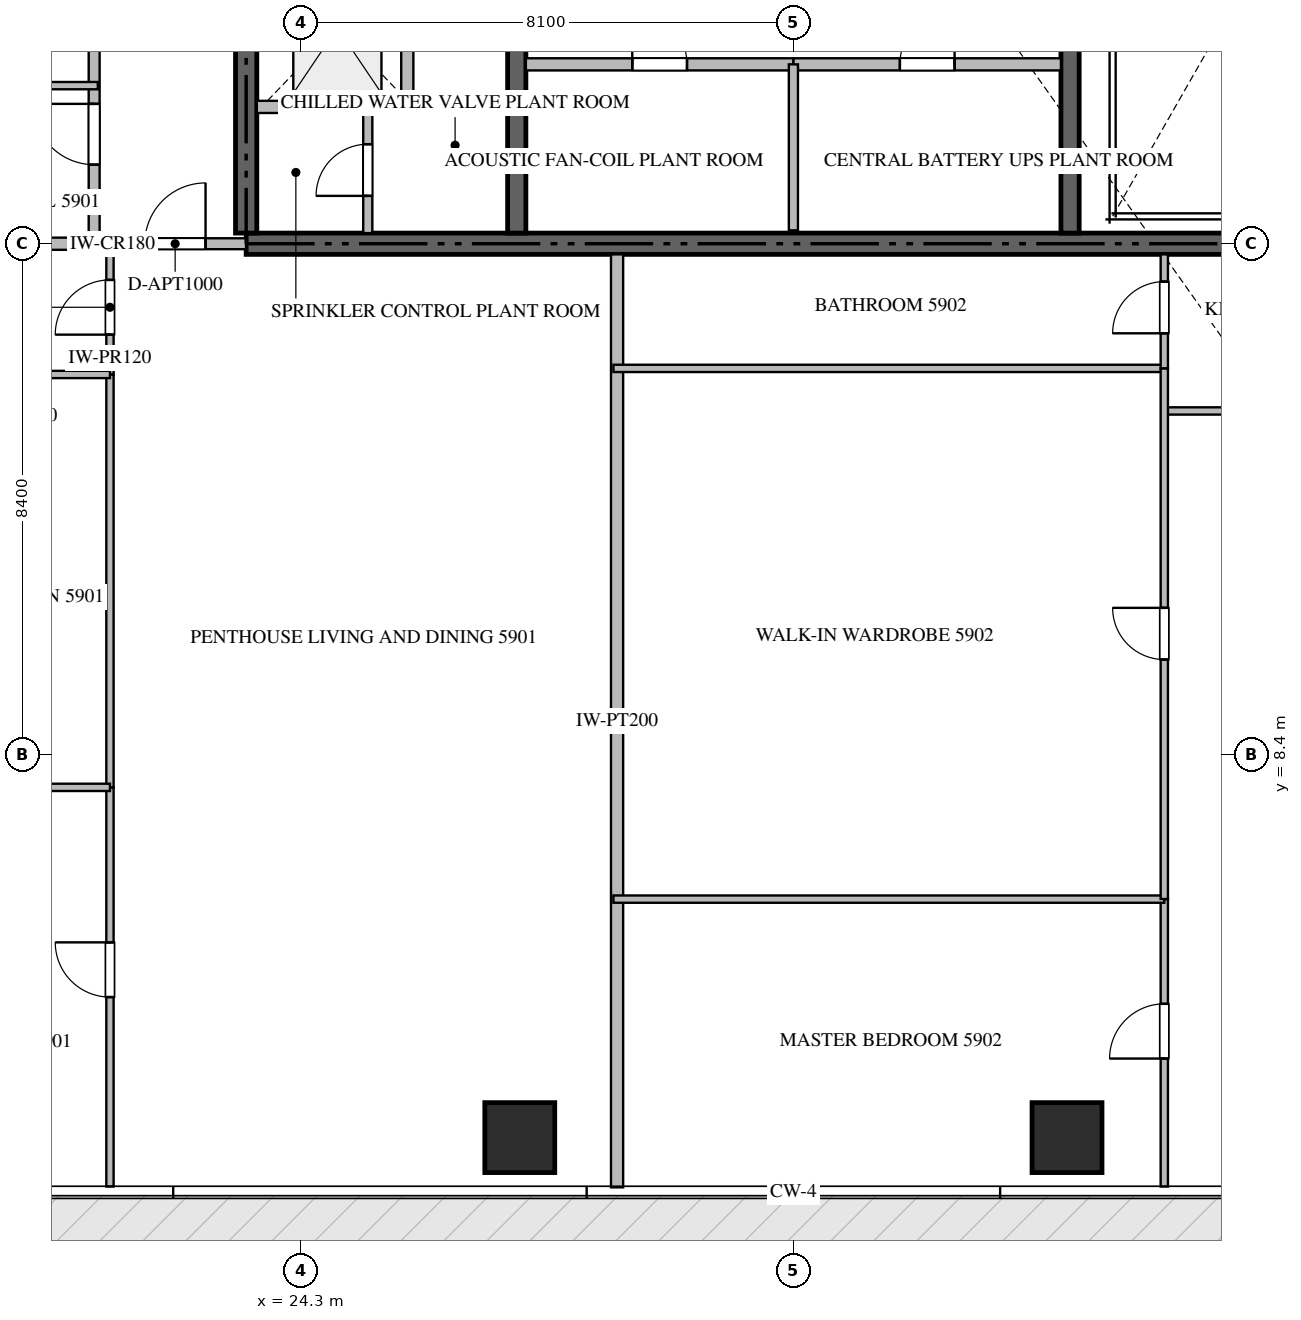
"""IFC4 building model, lengths in metres.
Left out: names, types, materials, properties, quantities, classifications, styles, units other than length and angle.
Written with IfcOpenShell. Run it as: python <this file> out.ifc"""

import sys

from ifc_helpers import new_model, si_unit, direction, frame, frame_2d, origin, origin_2d, place, context, subcontext, project, spatial, rectangle, extrude, source, transform, mapped, element, fill, save


model = new_model("IFC4")
c1 = context("Model", 3, precision=1e-05, world=origin(), true_north=direction((0.0, 1.0)))
c2 = subcontext(c1, "Body", "Model", "MODEL_VIEW")
j1 = project(units=[si_unit("LENGTHUNIT", "METRE"), si_unit("PLANEANGLEUNIT", "RADIAN")], contexts=[c1])
p1 = place(None, origin())
s1 = spatial("IfcSite", under=j1, at=p1, CompositionType="ELEMENT")
p2 = place(p1, origin())
s2 = spatial("IfcBuilding", under=s1, at=p2, CompositionType="ELEMENT")
p3 = place(p2, frame((0.0, 0.0, 237.4)))
s3 = spatial("IfcBuildingStorey", under=s2, at=p3, CompositionType="ELEMENT", Elevation=237.4)
p4 = place(p3, frame((23.4, 16.8, -0.26), z_axis=(0.0, 0.0, 1.0), x_axis=(1.0, 0.0, 0.0)))
e1 = element("IfcWall", 1, at=p4, inside=s3, PredefinedType="SHEAR", context=c2, shape_type="SweptSolid", body=[
    extrude(rectangle(XDim=18.0, YDim=0.35, at=frame_2d((9.0, 0.0))), origin(), (0.0, 0.0, 1.0), 3.848),
])
p5 = place(p3, frame((23.4, 16.975, -0.26), z_axis=(0.0, 0.0, 1.0), x_axis=(0.0, 1.0, 0.0)))
e2 = element("IfcWall", 2, at=p5, inside=s3, PredefinedType="SHEAR", context=c2, shape_type="SweptSolid", body=[
    extrude(rectangle(XDim=4.875, YDim=0.35, at=frame_2d((2.438, 0.0))), origin(), (0.0, 0.0, 1.0), 3.848),
])
p6 = place(p3, frame((27.85, 16.975, -0.26), z_axis=(0.0, 0.0, 1.0), x_axis=(0.0, 1.0, 0.0)))
e3 = element("IfcWall", 3, at=p6, inside=s3, PredefinedType="SHEAR", context=c2, shape_type="SweptSolid", body=[
    extrude(rectangle(XDim=4.875, YDim=0.3, at=frame_2d((2.438, 0.0))), origin(), (0.0, 0.0, 1.0), 3.848),
])
p7 = place(p3, frame((36.95, 16.975, -0.26), z_axis=(0.0, 0.0, 1.0), x_axis=(0.0, 1.0, 0.0)))
e4 = element("IfcWall", 4, at=p7, inside=s3, PredefinedType="SHEAR", context=c2, shape_type="SweptSolid", body=[
    extrude(rectangle(XDim=8.375, YDim=0.3, at=frame_2d((4.188, 0.0))), origin(), (0.0, 0.0, 1.0), 3.848),
])
m1 = source(origin(), c2, "Body", "SweptSolid", [
    extrude(rectangle(XDim=1.15, YDim=1.15, at=origin_2d()), origin(), (0.0, 0.0, 1.0), 3.85),
])
for number, where, z_axis, x_axis in (
    (5, (27.9, 2.1, -0.26), (0.0, 0.0, 1.0), (1.0, 0.0, 0.0)),
    (6, (36.9, 2.1, -0.26), (0.0, 0.0, 1.0), (1.0, 0.0, 0.0)),
):
    element("IfcColumn", number, at=place(p3, frame(where, z_axis=z_axis, x_axis=x_axis)), inside=s3, PredefinedType="COLUMN", context=c2, shape_type="MappedRepresentation", body=[
        mapped(m1, transform((0.0, 0.0, 0.0), scale=1.0)),
    ])
p8 = place(p3, frame((26.05, 19.05, 0.0), z_axis=(0.0, 0.0, 1.0), x_axis=(0.0, 1.0, 0.0)))
e7 = element("IfcWall", 7, at=p8, inside=s3, PredefinedType="STANDARD", context=c2, shape_type="SweptSolid", body=[
    extrude(rectangle(XDim=2.5, YDim=0.2, at=frame_2d((1.25, 0.0))), origin(), (0.0, 0.0, 1.0), 3.59),
])
p9 = place(p3, frame((23.575, 19.05, 0.0), z_axis=(0.0, 0.0, 1.0), x_axis=(1.0, 0.0, 0.0)))
e8 = element("IfcWall", 8, at=p9, inside=s3, PredefinedType="STANDARD", context=c2, shape_type="SweptSolid", body=[
    extrude(rectangle(XDim=2.475, YDim=0.2, at=frame_2d((1.238, 0.0))), origin(), (0.0, 0.0, 1.0), 3.59),
])
p10 = place(p3, frame((25.4, 16.975, 0.0), z_axis=(0.0, 0.0, 1.0), x_axis=(0.0, 1.0, 0.0)))
e9 = element("IfcWall", 9, at=p10, inside=s3, PredefinedType="PARTITIONING", context=c2, shape_type="SweptSolid", body=[
    extrude(rectangle(XDim=2.075, YDim=0.15, at=frame_2d((1.038, 0.0))), origin(), (0.0, 0.0, 1.0), 3.59),
])
p11 = place(p10, frame((0.612, 0.0, 0.0)))
e10 = element("IfcOpeningElement", 10, at=p11, cuts=e9, PredefinedType="OPENING", context=c2, shape_type="SweptSolid", body=[
    extrude(rectangle(XDim=0.85, YDim=2.1, at=frame_2d((0.425, 1.05))), frame((0.0, 0.085, 0.0), z_axis=(0.0, -1.0, 0.0), x_axis=(1.0, 0.0, 0.0)), (0.0, 0.0, 1.0), 0.17),
])
p12 = place(p3, frame((28.0, 19.75, 0.0), z_axis=(0.0, 0.0, 1.0), x_axis=(1.0, 0.0, 0.0)))
e11 = element("IfcWall", 11, at=p12, inside=s3, PredefinedType="STANDARD", context=c2, shape_type="SweptSolid", body=[
    extrude(rectangle(XDim=4.4, YDim=0.2, at=frame_2d((2.2, 0.0))), origin(), (0.0, 0.0, 1.0), 3.59),
])
p13 = place(p12, frame((1.75, 0.0, 0.0)))
e12 = element("IfcOpeningElement", 12, at=p13, cuts=e11, PredefinedType="OPENING", context=c2, shape_type="SweptSolid", body=[
    extrude(rectangle(XDim=0.9, YDim=2.1, at=frame_2d((0.45, 1.05))), frame((0.0, 0.11, 0.0), z_axis=(0.0, -1.0, 0.0), x_axis=(1.0, 0.0, 0.0)), (0.0, 0.0, 1.0), 0.22),
])
p14 = place(p3, frame((32.402, 19.75, 0.0), z_axis=(0.0, 0.0, 1.0), x_axis=(1.0, 0.0, 0.0)))
e13 = element("IfcWall", 13, at=p14, inside=s3, PredefinedType="STANDARD", context=c2, shape_type="SweptSolid", body=[
    extrude(rectangle(XDim=4.398, YDim=0.2, at=frame_2d((2.199, 0.0))), origin(), (0.0, 0.0, 1.0), 3.59),
])
p15 = place(p14, frame((1.749, 0.0, 0.0)))
e14 = element("IfcOpeningElement", 14, at=p15, cuts=e13, PredefinedType="OPENING", context=c2, shape_type="SweptSolid", body=[
    extrude(rectangle(XDim=0.9, YDim=2.1, at=frame_2d((0.45, 1.05))), frame((0.0, 0.11, 0.0), z_axis=(0.0, -1.0, 0.0), x_axis=(1.0, 0.0, 0.0)), (0.0, 0.0, 1.0), 0.22),
])
p16 = place(p3, frame((32.4, 17.02, 0.0), z_axis=(0.0, 0.0, 1.0), x_axis=(0.0, 1.0, 0.0)))
e15 = element("IfcWall", 15, at=p16, inside=s3, PredefinedType="PARTITIONING", context=c2, shape_type="SweptSolid", body=[
    extrude(rectangle(XDim=2.73, YDim=0.15, at=frame_2d((1.365, 0.0))), origin(), (0.0, 0.0, 1.0), 3.59),
])
p17 = place(p3, frame((29.5, 1.282, 0.0), z_axis=(0.0, 0.0, 1.0), x_axis=(0.0, 1.0, 0.0)))
e16 = element("IfcWall", 16, at=p17, inside=s3, PredefinedType="PARTITIONING", context=c2, shape_type="SweptSolid", body=[
    extrude(rectangle(XDim=15.343, YDim=0.2, at=frame_2d((7.671, 0.0))), origin(), (0.0, 0.0, 1.0), 3.59),
])
p18 = place(p3, frame((7.482, 16.8, 0.0), z_axis=(0.0, 0.0, 1.0), x_axis=(1.0, 0.0, 0.0)))
e17 = element("IfcWall", 17, at=p18, inside=s3, PredefinedType="PARTITIONING", context=c2, shape_type="SweptSolid", body=[
    extrude(rectangle(XDim=13.418, YDim=0.2, at=frame_2d((6.709, 0.0))), origin(), (0.0, 0.0, 1.0), 3.59),
])
p19 = place(p3, frame((20.902, 16.8, 0.0), z_axis=(0.0, 0.0, 1.0), x_axis=(1.0, 0.0, 0.0)))
e18 = element("IfcWall", 18, at=p19, inside=s3, PredefinedType="PARTITIONING", context=c2, shape_type="SweptSolid", body=[
    extrude(rectangle(XDim=2.496, YDim=0.18, at=frame_2d((1.248, 0.0))), origin(), (0.0, 0.0, 1.0), 3.59),
])
p20 = place(p19, frame((0.83, 0.0, 0.0)))
e19 = element("IfcOpeningElement", 19, at=p20, cuts=e18, PredefinedType="OPENING", context=c2, shape_type="SweptSolid", body=[
    extrude(rectangle(XDim=1.0, YDim=2.15, at=frame_2d((0.5, 1.075))), frame((0.0, 0.1, 0.0), z_axis=(0.0, -1.0, 0.0), x_axis=(1.0, 0.0, 0.0)), (0.0, 0.0, 1.0), 0.2),
])
p21 = place(p3, frame((20.9, 16.8, 0.0), z_axis=(0.0, 0.0, 1.0), x_axis=(0.0, 1.0, 0.0)))
e20 = element("IfcWall", 20, at=p21, inside=s3, PredefinedType="PARTITIONING", context=c2, shape_type="SweptSolid", body=[
    extrude(rectangle(XDim=16.8, YDim=0.18, at=frame_2d((8.4, 0.0))), origin(), (0.0, 0.0, 1.0), 3.59),
])
p22 = place(p21, frame((1.3, 0.0, 0.0)))
e21 = element("IfcOpeningElement", 21, at=p22, cuts=e20, PredefinedType="OPENING", context=c2, shape_type="SweptSolid", body=[
    extrude(rectangle(XDim=1.0, YDim=2.15, at=frame_2d((0.5, 1.075))), frame((0.0, 0.1, 0.0), z_axis=(0.0, -1.0, 0.0), x_axis=(1.0, 0.0, 0.0)), (0.0, 0.0, 1.0), 0.2),
])
p23 = place(p21, frame((9.18, 0.0, 0.0)))
e22 = element("IfcOpeningElement", 22, at=p23, cuts=e20, PredefinedType="OPENING", context=c2, shape_type="SweptSolid", body=[
    extrude(rectangle(XDim=1.0, YDim=2.15, at=frame_2d((0.5, 1.075))), frame((0.0, 0.1, 0.0), z_axis=(0.0, -1.0, 0.0), x_axis=(1.0, 0.0, 0.0)), (0.0, 0.0, 1.0), 0.2),
])
p24 = place(p21, frame((14.5, 0.0, 0.0)))
e23 = element("IfcOpeningElement", 23, at=p24, cuts=e20, PredefinedType="OPENING", context=c2, shape_type="SweptSolid", body=[
    extrude(rectangle(XDim=1.0, YDim=2.15, at=frame_2d((0.5, 1.075))), frame((0.0, 0.1, 0.0), z_axis=(0.0, -1.0, 0.0), x_axis=(1.0, 0.0, 0.0)), (0.0, 0.0, 1.0), 0.2),
])
p25 = place(p3, frame((21.16, 14.65, 0.0), z_axis=(0.0, 0.0, 1.0), x_axis=(0.0, 1.0, 0.0)))
e24 = element("IfcWall", 24, at=p25, inside=s3, PredefinedType="PARTITIONING", context=c2, shape_type="SweptSolid", body=[
    extrude(rectangle(XDim=2.21, YDim=0.12, at=frame_2d((1.105, 0.0))), origin(), (0.0, 0.0, 1.0), 3.59),
])
p26 = place(p25, frame((0.655, 0.0, 0.0)))
e25 = element("IfcOpeningElement", 25, at=p26, cuts=e24, PredefinedType="OPENING", context=c2, shape_type="SweptSolid", body=[
    extrude(rectangle(XDim=0.9, YDim=2.1, at=frame_2d((0.45, 1.05))), frame((0.0, 0.07, 0.0), z_axis=(0.0, -1.0, 0.0), x_axis=(1.0, 0.0, 0.0)), (0.0, 0.0, 1.0), 0.14),
])
p27 = place(p3, frame((21.16, 1.295, 0.0), z_axis=(0.0, 0.0, 1.0), x_axis=(0.0, 1.0, 0.0)))
e26 = element("IfcWall", 26, at=p27, inside=s3, PredefinedType="PARTITIONING", context=c2, shape_type="SweptSolid", body=[
    extrude(rectangle(XDim=6.565, YDim=0.12, at=frame_2d((3.283, 0.0))), origin(), (0.0, 0.0, 1.0), 3.59),
])
p28 = place(p27, frame((3.116, 0.0, 0.0)))
e27 = element("IfcOpeningElement", 27, at=p28, cuts=e26, PredefinedType="OPENING", context=c2, shape_type="SweptSolid", body=[
    extrude(rectangle(XDim=0.9, YDim=2.1, at=frame_2d((0.45, 1.05))), frame((0.0, 0.07, 0.0), z_axis=(0.0, -1.0, 0.0), x_axis=(1.0, 0.0, 0.0)), (0.0, 0.0, 1.0), 0.14),
])
p29 = place(p3, frame((21.16, 7.862, 0.0), z_axis=(0.0, 0.0, 1.0), x_axis=(0.0, 1.0, 0.0)))
e28 = element("IfcWall", 28, at=p29, inside=s3, PredefinedType="PARTITIONING", context=c2, shape_type="SweptSolid", body=[
    extrude(rectangle(XDim=6.786, YDim=0.12, at=frame_2d((3.393, 0.0))), origin(), (0.0, 0.0, 1.0), 3.59),
])
p30 = place(p3, frame((16.01, 7.86, 0.0), z_axis=(0.0, 0.0, 1.0), x_axis=(1.0, 0.0, 0.0)))
e29 = element("IfcWall", 29, at=p30, inside=s3, PredefinedType="PARTITIONING", context=c2, shape_type="SweptSolid", body=[
    extrude(rectangle(XDim=5.15, YDim=0.12, at=frame_2d((2.575, 0.0))), origin(), (0.0, 0.0, 1.0), 3.59),
])
p31 = place(p3, frame((18.112, 14.65, 0.0), z_axis=(0.0, 0.0, 1.0), x_axis=(1.0, 0.0, 0.0)))
e30 = element("IfcWall", 30, at=p31, inside=s3, PredefinedType="PARTITIONING", context=c2, shape_type="SweptSolid", body=[
    extrude(rectangle(XDim=3.048, YDim=0.12, at=frame_2d((1.524, 0.0))), origin(), (0.0, 0.0, 1.0), 3.59),
])
p32 = place(p31, frame((1.099, 0.0, 0.0)))
e31 = element("IfcOpeningElement", 31, at=p32, cuts=e30, PredefinedType="OPENING", context=c2, shape_type="SweptSolid", body=[
    extrude(rectangle(XDim=0.85, YDim=2.1, at=frame_2d((0.425, 1.05))), frame((0.0, 0.07, 0.0), z_axis=(0.0, -1.0, 0.0), x_axis=(1.0, 0.0, 0.0)), (0.0, 0.0, 1.0), 0.14),
])
p33 = place(p3, frame((38.5, 14.05, 0.0), z_axis=(0.0, 0.0, 1.0), x_axis=(1.0, 0.0, 0.0)))
e32 = element("IfcWall", 32, at=p33, inside=s3, PredefinedType="PARTITIONING", context=c2, shape_type="SweptSolid", body=[
    extrude(rectangle(XDim=2.85, YDim=0.12, at=frame_2d((1.425, 0.0))), origin(), (0.0, 0.0, 1.0), 3.59),
])
p34 = place(p33, frame((1.0, 0.0, 0.0)))
e33 = element("IfcOpeningElement", 33, at=p34, cuts=e32, PredefinedType="OPENING", context=c2, shape_type="SweptSolid", body=[
    extrude(rectangle(XDim=0.85, YDim=2.1, at=frame_2d((0.425, 1.05))), frame((0.0, 0.07, 0.0), z_axis=(0.0, -1.0, 0.0), x_axis=(1.0, 0.0, 0.0)), (0.0, 0.0, 1.0), 0.14),
])
p35 = place(p3, frame((38.5, 1.295, 0.0), z_axis=(0.0, 0.0, 1.0), x_axis=(0.0, 1.0, 0.0)))
e34 = element("IfcWall", 34, at=p35, inside=s3, PredefinedType="PARTITIONING", context=c2, shape_type="SweptSolid", body=[
    extrude(rectangle(XDim=4.727, YDim=0.12, at=frame_2d((2.364, 0.0))), origin(), (0.0, 0.0, 1.0), 3.59),
])
p36 = place(p35, frame((2.105, 0.0, 0.0)))
e35 = element("IfcOpeningElement", 35, at=p36, cuts=e34, PredefinedType="OPENING", context=c2, shape_type="SweptSolid", body=[
    extrude(rectangle(XDim=0.9, YDim=2.1, at=frame_2d((0.45, 1.05))), frame((0.0, 0.07, 0.0), z_axis=(0.0, -1.0, 0.0), x_axis=(1.0, 0.0, 0.0)), (0.0, 0.0, 1.0), 0.14),
])
for number, where, z_axis, x_axis in (
    (36, (29.44, 6.022, 0.0), (0.0, 0.0, 1.0), (1.0, 0.0, 0.0)),
    (37, (29.44, 14.75, 0.0), (0.0, 0.0, 1.0), (1.0, 0.0, 0.0)),
):
    element("IfcWall", number, at=place(p3, frame(where, z_axis=z_axis, x_axis=x_axis)), inside=s3, PredefinedType="PARTITIONING", context=c2, shape_type="SweptSolid", body=[
        extrude(rectangle(XDim=9.06, YDim=0.12, at=frame_2d((4.53, 0.0))), origin(), (0.0, 0.0, 1.0), 3.59),
    ])
p37 = place(p3, frame((38.5, 6.024, 0.0), z_axis=(0.0, 0.0, 1.0), x_axis=(0.0, 1.0, 0.0)))
e38 = element("IfcWall", 38, at=p37, inside=s3, PredefinedType="PARTITIONING", context=c2, shape_type="SweptSolid", body=[
    extrude(rectangle(XDim=8.726, YDim=0.12, at=frame_2d((4.363, 0.0))), origin(), (0.0, 0.0, 1.0), 3.59),
])
p38 = place(p37, frame((3.938, 0.0, 0.0)))
e39 = element("IfcOpeningElement", 39, at=p38, cuts=e38, PredefinedType="OPENING", context=c2, shape_type="SweptSolid", body=[
    extrude(rectangle(XDim=0.85, YDim=2.1, at=frame_2d((0.425, 1.05))), frame((0.0, 0.07, 0.0), z_axis=(0.0, -1.0, 0.0), x_axis=(1.0, 0.0, 0.0)), (0.0, 0.0, 1.0), 0.14),
])
p39 = place(p3, frame((38.5, 14.752, 0.0), z_axis=(0.0, 0.0, 1.0), x_axis=(0.0, 1.0, 0.0)))
e40 = element("IfcWall", 40, at=p39, inside=s3, PredefinedType="PARTITIONING", context=c2, shape_type="SweptSolid", body=[
    extrude(rectangle(XDim=1.873, YDim=0.12, at=frame_2d((0.937, 0.0))), origin(), (0.0, 0.0, 1.0), 3.59),
])
p40 = place(p39, frame((0.575, 0.0, 0.0)))
e41 = element("IfcOpeningElement", 41, at=p40, cuts=e40, PredefinedType="OPENING", context=c2, shape_type="SweptSolid", body=[
    extrude(rectangle(XDim=0.85, YDim=2.1, at=frame_2d((0.425, 1.05))), frame((0.0, 0.07, 0.0), z_axis=(0.0, -1.0, 0.0), x_axis=(1.0, 0.0, 0.0)), (0.0, 0.0, 1.0), 0.14),
])
p41 = place(p3, frame((18.352, 19.4, 0.0), z_axis=(0.0, 0.0, 1.0), x_axis=(1.0, 0.0, 0.0)))
e42 = element("IfcWall", 42, at=p41, inside=s3, PredefinedType="PARTITIONING", context=c2, shape_type="SweptSolid", body=[
    extrude(rectangle(XDim=2.608, YDim=0.12, at=frame_2d((1.304, 0.0))), origin(), (0.0, 0.0, 1.0), 3.59),
])
p42 = place(p41, frame((0.879, 0.0, 0.0)))
e43 = element("IfcOpeningElement", 43, at=p42, cuts=e42, PredefinedType="OPENING", context=c2, shape_type="SweptSolid", body=[
    extrude(rectangle(XDim=0.85, YDim=2.1, at=frame_2d((0.425, 1.05))), frame((0.0, 0.07, 0.0), z_axis=(0.0, -1.0, 0.0), x_axis=(1.0, 0.0, 0.0)), (0.0, 0.0, 1.0), 0.14),
])
m2 = source(origin(), c2, "Body", "SweptSolid", [
    extrude(rectangle(XDim=0.85, YDim=2.1, at=frame_2d((0.425, 1.05))), frame((0.0, 0.025, 0.0), z_axis=(0.0, -1.0, 0.0), x_axis=(1.0, 0.0, 0.0)), (0.0, 0.0, 1.0), 0.05),
])
p43 = place(p11, origin())
e44 = element("IfcDoor", 44, at=p43, inside=s3, OperationType="SINGLE_SWING_LEFT", PredefinedType="DOOR", context=c2, shape_type="MappedRepresentation", body=[
    mapped(m2, transform((0.0, 0.0, 0.0), scale=1.0)),
])
fill(e10, e44)
m3 = source(origin(), c2, "Body", "SweptSolid", [
    extrude(rectangle(XDim=0.9, YDim=2.1, at=frame_2d((0.45, 1.05))), frame((0.0, 0.025, 0.0), z_axis=(0.0, -1.0, 0.0), x_axis=(1.0, 0.0, 0.0)), (0.0, 0.0, 1.0), 0.05),
])
p44 = place(p13, origin())
e45 = element("IfcDoor", 45, at=p44, inside=s3, OperationType="SINGLE_SWING_LEFT", PredefinedType="DOOR", context=c2, shape_type="MappedRepresentation", body=[
    mapped(m3, transform((0.0, 0.0, 0.0), scale=1.0)),
])
fill(e12, e45)
p45 = place(p15, origin())
e46 = element("IfcDoor", 46, at=p45, inside=s3, OperationType="SINGLE_SWING_RIGHT", PredefinedType="DOOR", context=c2, shape_type="MappedRepresentation", body=[
    mapped(m3, transform((0.0, 0.0, 0.0), scale=1.0)),
])
fill(e14, e46)
m4 = source(origin(), c2, "Body", "SweptSolid", [
    extrude(rectangle(XDim=1.0, YDim=2.15, at=frame_2d((0.5, 1.075))), frame((0.0, 0.025, 0.0), z_axis=(0.0, -1.0, 0.0), x_axis=(1.0, 0.0, 0.0)), (0.0, 0.0, 1.0), 0.05),
])
p46 = place(p20, origin())
e47 = element("IfcDoor", 47, at=p46, inside=s3, OperationType="SINGLE_SWING_RIGHT", PredefinedType="DOOR", context=c2, shape_type="MappedRepresentation", body=[
    mapped(m4, transform((0.0, 0.0, 0.0), scale=1.0)),
])
fill(e19, e47)
p47 = place(p22, origin())
e48 = element("IfcDoor", 48, at=p47, inside=s3, OperationType="SINGLE_SWING_RIGHT", PredefinedType="DOOR", context=c2, shape_type="MappedRepresentation", body=[
    mapped(m4, transform((0.0, 0.0, 0.0), scale=1.0)),
])
fill(e21, e48)
p48 = place(p26, origin())
e49 = element("IfcDoor", 49, at=p48, inside=s3, OperationType="SINGLE_SWING_LEFT", PredefinedType="DOOR", context=c2, shape_type="MappedRepresentation", body=[
    mapped(m3, transform((0.0, 0.0, 0.0), scale=1.0)),
])
fill(e25, e49)
p49 = place(p28, origin())
e50 = element("IfcDoor", 50, at=p49, inside=s3, OperationType="SINGLE_SWING_RIGHT", PredefinedType="DOOR", context=c2, shape_type="MappedRepresentation", body=[
    mapped(m3, transform((0.0, 0.0, 0.0), scale=1.0)),
])
fill(e27, e50)
p50 = place(p36, origin())
e51 = element("IfcDoor", 51, at=p50, inside=s3, OperationType="SINGLE_SWING_LEFT", PredefinedType="DOOR", context=c2, shape_type="MappedRepresentation", body=[
    mapped(m3, transform((0.0, 0.0, 0.0), scale=1.0)),
])
fill(e35, e51)
p51 = place(p38, origin())
e52 = element("IfcDoor", 52, at=p51, inside=s3, OperationType="SINGLE_SWING_RIGHT", PredefinedType="DOOR", context=c2, shape_type="MappedRepresentation", body=[
    mapped(m2, transform((0.0, 0.0, 0.0), scale=1.0)),
])
fill(e39, e52)
p52 = place(p40, origin())
e53 = element("IfcDoor", 53, at=p52, inside=s3, OperationType="SINGLE_SWING_LEFT", PredefinedType="DOOR", context=c2, shape_type="MappedRepresentation", body=[
    mapped(m2, transform((0.0, 0.0, 0.0), scale=1.0)),
])
fill(e41, e53)
save(model, sys.argv[1])
